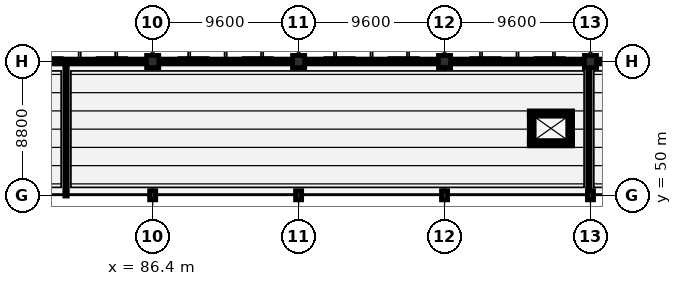
"""IFC4 building model, lengths in metres.
Left out: names, types, materials, properties, quantities, classifications, styles, units other than length and angle.
Written with IfcOpenShell. Run it as: python <this file> out.ifc"""

import sys

from ifc_helpers import new_model, si_unit, direction, frame, frame_2d, origin, origin_2d, place, context, subcontext, project, spatial, polyline, rectangle, outline, extrude, element, fill, save


model = new_model("IFC4")
c1 = context("Model", 3, precision=1e-05, world=origin(), true_north=direction((0.0, 1.0)))
c2 = subcontext(c1, "Body", "Model", "MODEL_VIEW")
j1 = project(units=[si_unit("LENGTHUNIT", "METRE"), si_unit("PLANEANGLEUNIT", "RADIAN")], contexts=[c1])
p1 = place(None, origin())
s1 = spatial("IfcSite", under=j1, at=p1, CompositionType="ELEMENT")
p2 = place(p1, origin())
s2 = spatial("IfcBuilding", under=s1, at=p2, CompositionType="ELEMENT")
p3 = place(p2, frame((0.0, 0.0, 9.6)))
s3 = spatial("IfcBuildingStorey", under=s2, at=p3, CompositionType="ELEMENT", Elevation=9.6)
p4 = place(p3, frame((86.4, 50.0, 0.0), z_axis=(0.0, 0.0, 1.0), x_axis=(1.0, 0.0, 0.0)))
e1 = element("IfcColumn", 1, at=p4, inside=s3, PredefinedType="COLUMN", context=c2, shape_type="SweptSolid", body=[
    extrude(rectangle(XDim=0.4, YDim=0.6, at=origin_2d()), origin(), (0.0, 0.0, 1.0), 4.5),
])
p5 = place(p3, frame((86.4, 58.8, 0.0), z_axis=(0.0, 0.0, 1.0), x_axis=(1.0, 0.0, 0.0)))
e2 = element("IfcColumn", 2, at=p5, inside=s3, PredefinedType="COLUMN", context=c2, shape_type="SweptSolid", body=[
    extrude(rectangle(XDim=0.8, YDim=0.8, at=origin_2d()), origin(), (0.0, 0.0, 1.0), 4.5),
])
p6 = place(p3, frame((96.0, 50.0, 0.0), z_axis=(0.0, 0.0, 1.0), x_axis=(1.0, 0.0, 0.0)))
e3 = element("IfcColumn", 3, at=p6, inside=s3, PredefinedType="COLUMN", context=c2, shape_type="SweptSolid", body=[
    extrude(rectangle(XDim=0.4, YDim=0.6, at=origin_2d()), origin(), (0.0, 0.0, 1.0), 4.5),
])
p7 = place(p3, frame((96.0, 58.8, 0.0), z_axis=(0.0, 0.0, 1.0), x_axis=(1.0, 0.0, 0.0)))
e4 = element("IfcColumn", 4, at=p7, inside=s3, PredefinedType="COLUMN", context=c2, shape_type="SweptSolid", body=[
    extrude(rectangle(XDim=0.8, YDim=0.8, at=origin_2d()), origin(), (0.0, 0.0, 1.0), 4.5),
])
p8 = place(p3, frame((105.6, 50.0, 0.0), z_axis=(0.0, 0.0, 1.0), x_axis=(1.0, 0.0, 0.0)))
e5 = element("IfcColumn", 5, at=p8, inside=s3, PredefinedType="COLUMN", context=c2, shape_type="SweptSolid", body=[
    extrude(rectangle(XDim=0.4, YDim=0.6, at=origin_2d()), origin(), (0.0, 0.0, 1.0), 4.5),
])
p9 = place(p3, frame((105.6, 58.8, 0.0), z_axis=(0.0, 0.0, 1.0), x_axis=(1.0, 0.0, 0.0)))
e6 = element("IfcColumn", 6, at=p9, inside=s3, PredefinedType="COLUMN", context=c2, shape_type="SweptSolid", body=[
    extrude(rectangle(XDim=0.8, YDim=0.8, at=origin_2d()), origin(), (0.0, 0.0, 1.0), 4.5),
])
p10 = place(p3, frame((115.2, 50.0, 0.0), z_axis=(0.0, 0.0, 1.0), x_axis=(1.0, 0.0, 0.0)))
e7 = element("IfcColumn", 7, at=p10, inside=s3, PredefinedType="COLUMN", context=c2, shape_type="SweptSolid", body=[
    extrude(rectangle(XDim=0.4, YDim=0.6, at=origin_2d()), origin(), (0.0, 0.0, 1.0), 4.5),
])
p11 = place(p3, frame((115.2, 58.8, 0.0), z_axis=(0.0, 0.0, 1.0), x_axis=(1.0, 0.0, 0.0)))
e8 = element("IfcColumn", 8, at=p11, inside=s3, PredefinedType="COLUMN", context=c2, shape_type="SweptSolid", body=[
    extrude(rectangle(XDim=0.8, YDim=0.8, at=origin_2d()), origin(), (0.0, 0.0, 1.0), 4.5),
])
p12 = place(p3, frame((77.2, 58.8, 0.0), z_axis=(0.0, 0.0, 1.0), x_axis=(1.0, 0.0, 0.0)))
e9 = element("IfcWall", 9, at=p12, inside=s3, PredefinedType="STANDARD", context=c2, shape_type="SweptSolid", body=[
    extrude(rectangle(XDim=8.8, YDim=0.3, at=frame_2d((4.4, 0.0))), origin(), (0.0, 0.0, 1.0), 1.85),
])
p13 = place(p3, frame((77.2, 58.8, 2.38), z_axis=(0.0, 0.0, 1.0), x_axis=(1.0, 0.0, 0.0)))
e10 = element("IfcWall", 10, at=p13, inside=s3, PredefinedType="STANDARD", context=c2, shape_type="SweptSolid", body=[
    extrude(outline(polyline([(0.0, 0.0), (8.8, 0.0), (8.8, 4.1), (0.0, 3.997), (0.0, 0.0)])), frame((0.0, 0.15, 0.0), z_axis=(0.0, -1.0, 0.0), x_axis=(1.0, 0.0, 0.0)), (0.0, 0.0, 1.0), 0.3),
])
p14 = place(p13, frame((0.85, 0.0, 0.25)))
e11 = element("IfcOpeningElement", 11, at=p14, cuts=e10, PredefinedType="OPENING", context=c2, shape_type="SweptSolid", body=[
    extrude(rectangle(XDim=0.67, YDim=2.29, at=frame_2d((0.335, 1.145))), frame((0.0, 0.16, 0.0), z_axis=(0.0, -1.0, 0.0), x_axis=(1.0, 0.0, 0.0)), (0.0, 0.0, 1.0), 0.32),
])
p15 = place(p13, frame((2.9, 0.0, 0.25)))
e12 = element("IfcOpeningElement", 12, at=p15, cuts=e10, PredefinedType="OPENING", context=c2, shape_type="SweptSolid", body=[
    extrude(rectangle(XDim=0.63, YDim=2.26, at=frame_2d((0.315, 1.13))), frame((0.0, 0.16, 0.0), z_axis=(0.0, -1.0, 0.0), x_axis=(1.0, 0.0, 0.0)), (0.0, 0.0, 1.0), 0.32),
])
p16 = place(p13, frame((4.95, 0.0, 0.25)))
e13 = element("IfcOpeningElement", 13, at=p16, cuts=e10, PredefinedType="OPENING", context=c2, shape_type="SweptSolid", body=[
    extrude(rectangle(XDim=0.75, YDim=2.35, at=frame_2d((0.375, 1.175))), frame((0.0, 0.16, 0.0), z_axis=(0.0, -1.0, 0.0), x_axis=(1.0, 0.0, 0.0)), (0.0, 0.0, 1.0), 0.32),
])
p17 = place(p13, frame((7.0, 0.0, 0.25)))
e14 = element("IfcOpeningElement", 14, at=p17, cuts=e10, PredefinedType="OPENING", context=c2, shape_type="SweptSolid", body=[
    extrude(rectangle(XDim=0.71, YDim=2.32, at=frame_2d((0.355, 1.16))), frame((0.0, 0.16, 0.0), z_axis=(0.0, -1.0, 0.0), x_axis=(1.0, 0.0, 0.0)), (0.0, 0.0, 1.0), 0.32),
])
p18 = place(p3, frame((86.8, 58.8, 0.0), z_axis=(0.0, 0.0, 1.0), x_axis=(1.0, 0.0, 0.0)))
e15 = element("IfcWall", 15, at=p18, inside=s3, PredefinedType="STANDARD", context=c2, shape_type="SweptSolid", body=[
    extrude(rectangle(XDim=8.8, YDim=0.3, at=frame_2d((4.4, 0.0))), origin(), (0.0, 0.0, 1.0), 1.85),
])
p19 = place(p3, frame((86.8, 58.8, 2.38), z_axis=(0.0, 0.0, 1.0), x_axis=(1.0, 0.0, 0.0)))
e16 = element("IfcWall", 16, at=p19, inside=s3, PredefinedType="STANDARD", context=c2, shape_type="SweptSolid", body=[
    extrude(outline(polyline([(0.0, 0.0), (8.8, 0.0), (8.8, 3.997), (0.0, 4.1), (0.0, 0.0)])), frame((0.0, 0.15, 0.0), z_axis=(0.0, -1.0, 0.0), x_axis=(1.0, 0.0, 0.0)), (0.0, 0.0, 1.0), 0.3),
])
p20 = place(p19, frame((0.85, 0.0, 0.25)))
e17 = element("IfcOpeningElement", 17, at=p20, cuts=e16, PredefinedType="OPENING", context=c2, shape_type="SweptSolid", body=[
    extrude(rectangle(XDim=0.67, YDim=2.29, at=frame_2d((0.335, 1.145))), frame((0.0, 0.16, 0.0), z_axis=(0.0, -1.0, 0.0), x_axis=(1.0, 0.0, 0.0)), (0.0, 0.0, 1.0), 0.32),
])
p21 = place(p19, frame((2.9, 0.0, 0.25)))
e18 = element("IfcOpeningElement", 18, at=p21, cuts=e16, PredefinedType="OPENING", context=c2, shape_type="SweptSolid", body=[
    extrude(rectangle(XDim=0.63, YDim=2.26, at=frame_2d((0.315, 1.13))), frame((0.0, 0.16, 0.0), z_axis=(0.0, -1.0, 0.0), x_axis=(1.0, 0.0, 0.0)), (0.0, 0.0, 1.0), 0.32),
])
p22 = place(p19, frame((4.95, 0.0, 0.25)))
e19 = element("IfcOpeningElement", 19, at=p22, cuts=e16, PredefinedType="OPENING", context=c2, shape_type="SweptSolid", body=[
    extrude(rectangle(XDim=0.75, YDim=2.35, at=frame_2d((0.375, 1.175))), frame((0.0, 0.16, 0.0), z_axis=(0.0, -1.0, 0.0), x_axis=(1.0, 0.0, 0.0)), (0.0, 0.0, 1.0), 0.32),
])
p23 = place(p19, frame((7.0, 0.0, 0.25)))
e20 = element("IfcOpeningElement", 20, at=p23, cuts=e16, PredefinedType="OPENING", context=c2, shape_type="SweptSolid", body=[
    extrude(rectangle(XDim=0.71, YDim=2.32, at=frame_2d((0.355, 1.16))), frame((0.0, 0.16, 0.0), z_axis=(0.0, -1.0, 0.0), x_axis=(1.0, 0.0, 0.0)), (0.0, 0.0, 1.0), 0.32),
])
p24 = place(p3, frame((96.4, 58.8, 0.0), z_axis=(0.0, 0.0, 1.0), x_axis=(1.0, 0.0, 0.0)))
e21 = element("IfcWall", 21, at=p24, inside=s3, PredefinedType="STANDARD", context=c2, shape_type="SweptSolid", body=[
    extrude(rectangle(XDim=8.8, YDim=0.3, at=frame_2d((4.4, 0.0))), origin(), (0.0, 0.0, 1.0), 1.85),
])
p25 = place(p3, frame((96.4, 58.8, 2.38), z_axis=(0.0, 0.0, 1.0), x_axis=(1.0, 0.0, 0.0)))
e22 = element("IfcWall", 22, at=p25, inside=s3, PredefinedType="STANDARD", context=c2, shape_type="SweptSolid", body=[
    extrude(outline(polyline([(0.0, 0.0), (8.8, 0.0), (8.8, 3.705), (0.0, 3.997), (0.0, 0.0)])), frame((0.0, 0.15, 0.0), z_axis=(0.0, -1.0, 0.0), x_axis=(1.0, 0.0, 0.0)), (0.0, 0.0, 1.0), 0.3),
])
p26 = place(p25, frame((0.85, 0.0, 0.25)))
e23 = element("IfcOpeningElement", 23, at=p26, cuts=e22, PredefinedType="OPENING", context=c2, shape_type="SweptSolid", body=[
    extrude(rectangle(XDim=0.67, YDim=2.29, at=frame_2d((0.335, 1.145))), frame((0.0, 0.16, 0.0), z_axis=(0.0, -1.0, 0.0), x_axis=(1.0, 0.0, 0.0)), (0.0, 0.0, 1.0), 0.32),
])
p27 = place(p25, frame((2.9, 0.0, 0.25)))
e24 = element("IfcOpeningElement", 24, at=p27, cuts=e22, PredefinedType="OPENING", context=c2, shape_type="SweptSolid", body=[
    extrude(rectangle(XDim=0.63, YDim=2.26, at=frame_2d((0.315, 1.13))), frame((0.0, 0.16, 0.0), z_axis=(0.0, -1.0, 0.0), x_axis=(1.0, 0.0, 0.0)), (0.0, 0.0, 1.0), 0.32),
])
p28 = place(p25, frame((4.95, 0.0, 0.25)))
e25 = element("IfcOpeningElement", 25, at=p28, cuts=e22, PredefinedType="OPENING", context=c2, shape_type="SweptSolid", body=[
    extrude(rectangle(XDim=0.75, YDim=2.35, at=frame_2d((0.375, 1.175))), frame((0.0, 0.16, 0.0), z_axis=(0.0, -1.0, 0.0), x_axis=(1.0, 0.0, 0.0)), (0.0, 0.0, 1.0), 0.32),
])
p29 = place(p25, frame((7.0, 0.0, 0.25)))
e26 = element("IfcOpeningElement", 26, at=p29, cuts=e22, PredefinedType="OPENING", context=c2, shape_type="SweptSolid", body=[
    extrude(rectangle(XDim=0.71, YDim=2.32, at=frame_2d((0.355, 1.16))), frame((0.0, 0.16, 0.0), z_axis=(0.0, -1.0, 0.0), x_axis=(1.0, 0.0, 0.0)), (0.0, 0.0, 1.0), 0.32),
])
p30 = place(p3, frame((106.0, 58.8, 0.0), z_axis=(0.0, 0.0, 1.0), x_axis=(1.0, 0.0, 0.0)))
e27 = element("IfcWall", 27, at=p30, inside=s3, PredefinedType="STANDARD", context=c2, shape_type="SweptSolid", body=[
    extrude(rectangle(XDim=8.8, YDim=0.3, at=frame_2d((4.4, 0.0))), origin(), (0.0, 0.0, 1.0), 1.85),
])
p31 = place(p3, frame((106.0, 58.8, 2.38), z_axis=(0.0, 0.0, 1.0), x_axis=(1.0, 0.0, 0.0)))
e28 = element("IfcWall", 28, at=p31, inside=s3, PredefinedType="STANDARD", context=c2, shape_type="SweptSolid", body=[
    extrude(outline(polyline([(0.0, 0.0), (8.8, 0.0), (8.8, 3.267), (0.0, 3.705), (0.0, 0.0)])), frame((0.0, 0.15, 0.0), z_axis=(0.0, -1.0, 0.0), x_axis=(1.0, 0.0, 0.0)), (0.0, 0.0, 1.0), 0.3),
])
p32 = place(p31, frame((0.85, 0.0, 0.25)))
e29 = element("IfcOpeningElement", 29, at=p32, cuts=e28, PredefinedType="OPENING", context=c2, shape_type="SweptSolid", body=[
    extrude(rectangle(XDim=0.67, YDim=2.29, at=frame_2d((0.335, 1.145))), frame((0.0, 0.16, 0.0), z_axis=(0.0, -1.0, 0.0), x_axis=(1.0, 0.0, 0.0)), (0.0, 0.0, 1.0), 0.32),
])
p33 = place(p31, frame((2.9, 0.0, 0.25)))
e30 = element("IfcOpeningElement", 30, at=p33, cuts=e28, PredefinedType="OPENING", context=c2, shape_type="SweptSolid", body=[
    extrude(rectangle(XDim=0.63, YDim=2.26, at=frame_2d((0.315, 1.13))), frame((0.0, 0.16, 0.0), z_axis=(0.0, -1.0, 0.0), x_axis=(1.0, 0.0, 0.0)), (0.0, 0.0, 1.0), 0.32),
])
p34 = place(p31, frame((4.95, 0.0, 0.25)))
e31 = element("IfcOpeningElement", 31, at=p34, cuts=e28, PredefinedType="OPENING", context=c2, shape_type="SweptSolid", body=[
    extrude(rectangle(XDim=0.75, YDim=2.35, at=frame_2d((0.375, 1.175))), frame((0.0, 0.16, 0.0), z_axis=(0.0, -1.0, 0.0), x_axis=(1.0, 0.0, 0.0)), (0.0, 0.0, 1.0), 0.32),
])
p35 = place(p31, frame((7.0, 0.0, 0.25)))
e32 = element("IfcOpeningElement", 32, at=p35, cuts=e28, PredefinedType="OPENING", context=c2, shape_type="SweptSolid", body=[
    extrude(rectangle(XDim=0.71, YDim=2.32, at=frame_2d((0.355, 1.16))), frame((0.0, 0.16, 0.0), z_axis=(0.0, -1.0, 0.0), x_axis=(1.0, 0.0, 0.0)), (0.0, 0.0, 1.0), 0.32),
])
p36 = place(p3, frame((115.6, 58.8, 0.0), z_axis=(0.0, 0.0, 1.0), x_axis=(1.0, 0.0, 0.0)))
e33 = element("IfcWall", 33, at=p36, inside=s3, PredefinedType="STANDARD", context=c2, shape_type="SweptSolid", body=[
    extrude(rectangle(XDim=8.8, YDim=0.3, at=frame_2d((4.4, 0.0))), origin(), (0.0, 0.0, 1.0), 1.85),
])
p37 = place(p3, frame((115.6, 58.8, 2.38), z_axis=(0.0, 0.0, 1.0), x_axis=(1.0, 0.0, 0.0)))
e34 = element("IfcWall", 34, at=p37, inside=s3, PredefinedType="STANDARD", context=c2, shape_type="SweptSolid", body=[
    extrude(outline(polyline([(0.0, 0.0), (8.8, 0.0), (8.8, 2.75), (0.0, 3.267), (0.0, 0.0)])), frame((0.0, 0.15, 0.0), z_axis=(0.0, -1.0, 0.0), x_axis=(1.0, 0.0, 0.0)), (0.0, 0.0, 1.0), 0.3),
])
p38 = place(p37, frame((0.85, 0.0, 0.25)))
e35 = element("IfcOpeningElement", 35, at=p38, cuts=e34, PredefinedType="OPENING", context=c2, shape_type="SweptSolid", body=[
    extrude(rectangle(XDim=0.67, YDim=2.29, at=frame_2d((0.335, 1.145))), frame((0.0, 0.16, 0.0), z_axis=(0.0, -1.0, 0.0), x_axis=(1.0, 0.0, 0.0)), (0.0, 0.0, 1.0), 0.32),
])
p39 = place(p37, frame((2.9, 0.0, 0.25)))
e36 = element("IfcOpeningElement", 36, at=p39, cuts=e34, PredefinedType="OPENING", context=c2, shape_type="SweptSolid", body=[
    extrude(rectangle(XDim=0.63, YDim=2.26, at=frame_2d((0.315, 1.13))), frame((0.0, 0.16, 0.0), z_axis=(0.0, -1.0, 0.0), x_axis=(1.0, 0.0, 0.0)), (0.0, 0.0, 1.0), 0.32),
])
p40 = place(p37, frame((4.95, 0.0, 0.25)))
e37 = element("IfcOpeningElement", 37, at=p40, cuts=e34, PredefinedType="OPENING", context=c2, shape_type="SweptSolid", body=[
    extrude(rectangle(XDim=0.75, YDim=2.35, at=frame_2d((0.375, 1.175))), frame((0.0, 0.16, 0.0), z_axis=(0.0, -1.0, 0.0), x_axis=(1.0, 0.0, 0.0)), (0.0, 0.0, 1.0), 0.32),
])
p41 = place(p37, frame((7.0, 0.0, 0.25)))
e38 = element("IfcOpeningElement", 38, at=p41, cuts=e34, PredefinedType="OPENING", context=c2, shape_type="SweptSolid", body=[
    extrude(rectangle(XDim=0.71, YDim=2.32, at=frame_2d((0.355, 1.16))), frame((0.0, 0.16, 0.0), z_axis=(0.0, -1.0, 0.0), x_axis=(1.0, 0.0, 0.0)), (0.0, 0.0, 1.0), 0.32),
])
p42 = place(p3, frame((114.025, 53.375, 0.0), z_axis=(0.0, 0.0, 1.0), x_axis=(-1.0, 0.0, 0.0)))
e39 = element("IfcWall", 39, at=p42, inside=s3, PredefinedType="SOLIDWALL", context=c2, shape_type="SweptSolid", body=[
    extrude(rectangle(XDim=2.85, YDim=0.25, at=frame_2d((1.425, 0.0))), origin(), (0.0, 0.0, 1.0), 3.55),
])
p43 = place(p42, frame((0.875, 0.0, 0.0)))
e40 = element("IfcOpeningElement", 40, at=p43, cuts=e39, PredefinedType="OPENING", context=c2, shape_type="SweptSolid", body=[
    extrude(rectangle(XDim=1.1, YDim=2.15, at=frame_2d((0.55, 1.075))), frame((0.0, 0.135, 0.0), z_axis=(0.0, -1.0, 0.0), x_axis=(1.0, 0.0, 0.0)), (0.0, 0.0, 1.0), 0.27),
])
p44 = place(p3, frame((111.175, 55.425, 0.0), z_axis=(0.0, 0.0, 1.0), x_axis=(1.0, 0.0, 0.0)))
e41 = element("IfcWall", 41, at=p44, inside=s3, PredefinedType="SOLIDWALL", context=c2, shape_type="SweptSolid", body=[
    extrude(rectangle(XDim=2.85, YDim=0.25, at=frame_2d((1.425, 0.0))), origin(), (0.0, 0.0, 1.0), 3.55),
])
for number, where, z_axis, x_axis in (
    (42, (111.3, 53.5, 0.0), (0.0, 0.0, 1.0), (0.0, 1.0, 0.0)),
    (43, (113.9, 55.3, 0.0), (0.0, 0.0, 1.0), (0.0, -1.0, 0.0)),
):
    element("IfcWall", number, at=place(p3, frame(where, z_axis=z_axis, x_axis=x_axis)), inside=s3, PredefinedType="SOLIDWALL", context=c2, shape_type="SweptSolid", body=[
        extrude(rectangle(XDim=1.8, YDim=0.25, at=frame_2d((0.9, 0.0))), origin(), (0.0, 0.0, 1.0), 3.55),
    ])
p45 = place(p3, frame((80.7, 49.95, 0.0), z_axis=(0.0, 0.0, 1.0), x_axis=(0.0, 1.0, 0.0)))
e44 = element("IfcWall", 44, at=p45, inside=s3, PredefinedType="PARTITIONING", context=c2, shape_type="SweptSolid", body=[
    extrude(rectangle(XDim=8.8, YDim=0.16, at=frame_2d((4.4, 0.0))), origin(), (0.0, 0.0, 1.0), 2.4),
])
p46 = place(p45, frame((3.5, 0.0, 0.0)))
e45 = element("IfcOpeningElement", 45, at=p46, cuts=e44, PredefinedType="OPENING", context=c2, shape_type="SweptSolid", body=[
    extrude(rectangle(XDim=1.8, YDim=2.15, at=frame_2d((0.9, 1.075))), frame((0.0, 0.09, 0.0), z_axis=(0.0, -1.0, 0.0), x_axis=(1.0, 0.0, 0.0)), (0.0, 0.0, 1.0), 0.18),
])
p47 = place(p3, frame((115.1, 49.95, 0.0), z_axis=(0.0, 0.0, 1.0), x_axis=(0.0, 1.0, 0.0)))
e46 = element("IfcWall", 46, at=p47, inside=s3, PredefinedType="PARTITIONING", context=c2, shape_type="SweptSolid", body=[
    extrude(rectangle(XDim=8.8, YDim=0.16, at=frame_2d((4.4, 0.0))), origin(), (0.0, 0.0, 1.0), 2.4),
])
p48 = place(p47, frame((3.5, 0.0, 0.0)))
e47 = element("IfcOpeningElement", 47, at=p48, cuts=e46, PredefinedType="OPENING", context=c2, shape_type="SweptSolid", body=[
    extrude(rectangle(XDim=1.8, YDim=2.15, at=frame_2d((0.9, 1.075))), frame((0.0, 0.09, 0.0), z_axis=(0.0, -1.0, 0.0), x_axis=(1.0, 0.0, 0.0)), (0.0, 0.0, 1.0), 0.18),
])
p49 = place(p15, origin())
e48 = element("IfcWindow", 48, at=p49, inside=s3, PartitioningType="SINGLE_PANEL", PredefinedType="WINDOW", context=c2, shape_type="SweptSolid", body=[
    extrude(rectangle(XDim=0.63, YDim=2.26, at=frame_2d((0.315, 1.13))), frame((0.0, 0.03, 0.0), z_axis=(0.0, -1.0, 0.0), x_axis=(1.0, 0.0, 0.0)), (0.0, 0.0, 1.0), 0.06),
])
fill(e12, e48)
p50 = place(p16, origin())
e49 = element("IfcWindow", 49, at=p50, inside=s3, PartitioningType="SINGLE_PANEL", PredefinedType="WINDOW", context=c2, shape_type="SweptSolid", body=[
    extrude(rectangle(XDim=0.75, YDim=2.35, at=frame_2d((0.375, 1.175))), frame((0.0, 0.03, 0.0), z_axis=(0.0, -1.0, 0.0), x_axis=(1.0, 0.0, 0.0)), (0.0, 0.0, 1.0), 0.06),
])
fill(e13, e49)
p51 = place(p17, origin())
e50 = element("IfcWindow", 50, at=p51, inside=s3, PartitioningType="SINGLE_PANEL", PredefinedType="WINDOW", context=c2, shape_type="SweptSolid", body=[
    extrude(rectangle(XDim=0.71, YDim=2.32, at=frame_2d((0.355, 1.16))), frame((0.0, 0.03, 0.0), z_axis=(0.0, -1.0, 0.0), x_axis=(1.0, 0.0, 0.0)), (0.0, 0.0, 1.0), 0.06),
])
fill(e14, e50)
p52 = place(p20, origin())
e51 = element("IfcWindow", 51, at=p52, inside=s3, PartitioningType="SINGLE_PANEL", PredefinedType="WINDOW", context=c2, shape_type="SweptSolid", body=[
    extrude(rectangle(XDim=0.67, YDim=2.29, at=frame_2d((0.335, 1.145))), frame((0.0, 0.03, 0.0), z_axis=(0.0, -1.0, 0.0), x_axis=(1.0, 0.0, 0.0)), (0.0, 0.0, 1.0), 0.06),
])
fill(e17, e51)
p53 = place(p21, origin())
e52 = element("IfcWindow", 52, at=p53, inside=s3, PartitioningType="SINGLE_PANEL", PredefinedType="WINDOW", context=c2, shape_type="SweptSolid", body=[
    extrude(rectangle(XDim=0.63, YDim=2.26, at=frame_2d((0.315, 1.13))), frame((0.0, 0.03, 0.0), z_axis=(0.0, -1.0, 0.0), x_axis=(1.0, 0.0, 0.0)), (0.0, 0.0, 1.0), 0.06),
])
fill(e18, e52)
p54 = place(p22, origin())
e53 = element("IfcWindow", 53, at=p54, inside=s3, PartitioningType="SINGLE_PANEL", PredefinedType="WINDOW", context=c2, shape_type="SweptSolid", body=[
    extrude(rectangle(XDim=0.75, YDim=2.35, at=frame_2d((0.375, 1.175))), frame((0.0, 0.03, 0.0), z_axis=(0.0, -1.0, 0.0), x_axis=(1.0, 0.0, 0.0)), (0.0, 0.0, 1.0), 0.06),
])
fill(e19, e53)
p55 = place(p23, origin())
e54 = element("IfcWindow", 54, at=p55, inside=s3, PartitioningType="SINGLE_PANEL", PredefinedType="WINDOW", context=c2, shape_type="SweptSolid", body=[
    extrude(rectangle(XDim=0.71, YDim=2.32, at=frame_2d((0.355, 1.16))), frame((0.0, 0.03, 0.0), z_axis=(0.0, -1.0, 0.0), x_axis=(1.0, 0.0, 0.0)), (0.0, 0.0, 1.0), 0.06),
])
fill(e20, e54)
p56 = place(p26, origin())
e55 = element("IfcWindow", 55, at=p56, inside=s3, PartitioningType="SINGLE_PANEL", PredefinedType="WINDOW", context=c2, shape_type="SweptSolid", body=[
    extrude(rectangle(XDim=0.67, YDim=2.29, at=frame_2d((0.335, 1.145))), frame((0.0, 0.03, 0.0), z_axis=(0.0, -1.0, 0.0), x_axis=(1.0, 0.0, 0.0)), (0.0, 0.0, 1.0), 0.06),
])
fill(e23, e55)
p57 = place(p27, origin())
e56 = element("IfcWindow", 56, at=p57, inside=s3, PartitioningType="SINGLE_PANEL", PredefinedType="WINDOW", context=c2, shape_type="SweptSolid", body=[
    extrude(rectangle(XDim=0.63, YDim=2.26, at=frame_2d((0.315, 1.13))), frame((0.0, 0.03, 0.0), z_axis=(0.0, -1.0, 0.0), x_axis=(1.0, 0.0, 0.0)), (0.0, 0.0, 1.0), 0.06),
])
fill(e24, e56)
p58 = place(p28, origin())
e57 = element("IfcWindow", 57, at=p58, inside=s3, PartitioningType="SINGLE_PANEL", PredefinedType="WINDOW", context=c2, shape_type="SweptSolid", body=[
    extrude(rectangle(XDim=0.75, YDim=2.35, at=frame_2d((0.375, 1.175))), frame((0.0, 0.03, 0.0), z_axis=(0.0, -1.0, 0.0), x_axis=(1.0, 0.0, 0.0)), (0.0, 0.0, 1.0), 0.06),
])
fill(e25, e57)
p59 = place(p29, origin())
e58 = element("IfcWindow", 58, at=p59, inside=s3, PartitioningType="SINGLE_PANEL", PredefinedType="WINDOW", context=c2, shape_type="SweptSolid", body=[
    extrude(rectangle(XDim=0.71, YDim=2.32, at=frame_2d((0.355, 1.16))), frame((0.0, 0.03, 0.0), z_axis=(0.0, -1.0, 0.0), x_axis=(1.0, 0.0, 0.0)), (0.0, 0.0, 1.0), 0.06),
])
fill(e26, e58)
p60 = place(p32, origin())
e59 = element("IfcWindow", 59, at=p60, inside=s3, PartitioningType="SINGLE_PANEL", PredefinedType="WINDOW", context=c2, shape_type="SweptSolid", body=[
    extrude(rectangle(XDim=0.67, YDim=2.29, at=frame_2d((0.335, 1.145))), frame((0.0, 0.03, 0.0), z_axis=(0.0, -1.0, 0.0), x_axis=(1.0, 0.0, 0.0)), (0.0, 0.0, 1.0), 0.06),
])
fill(e29, e59)
p61 = place(p33, origin())
e60 = element("IfcWindow", 60, at=p61, inside=s3, PartitioningType="SINGLE_PANEL", PredefinedType="WINDOW", context=c2, shape_type="SweptSolid", body=[
    extrude(rectangle(XDim=0.63, YDim=2.26, at=frame_2d((0.315, 1.13))), frame((0.0, 0.03, 0.0), z_axis=(0.0, -1.0, 0.0), x_axis=(1.0, 0.0, 0.0)), (0.0, 0.0, 1.0), 0.06),
])
fill(e30, e60)
p62 = place(p34, origin())
e61 = element("IfcWindow", 61, at=p62, inside=s3, PartitioningType="SINGLE_PANEL", PredefinedType="WINDOW", context=c2, shape_type="SweptSolid", body=[
    extrude(rectangle(XDim=0.75, YDim=2.35, at=frame_2d((0.375, 1.175))), frame((0.0, 0.03, 0.0), z_axis=(0.0, -1.0, 0.0), x_axis=(1.0, 0.0, 0.0)), (0.0, 0.0, 1.0), 0.06),
])
fill(e31, e61)
p63 = place(p35, origin())
e62 = element("IfcWindow", 62, at=p63, inside=s3, PartitioningType="SINGLE_PANEL", PredefinedType="WINDOW", context=c2, shape_type="SweptSolid", body=[
    extrude(rectangle(XDim=0.71, YDim=2.32, at=frame_2d((0.355, 1.16))), frame((0.0, 0.03, 0.0), z_axis=(0.0, -1.0, 0.0), x_axis=(1.0, 0.0, 0.0)), (0.0, 0.0, 1.0), 0.06),
])
fill(e32, e62)
p64 = place(p43, origin())
e63 = element("IfcDoor", 63, at=p64, inside=s3, OperationType="DOUBLE_DOOR_SLIDING", PredefinedType="DOOR", context=c2, shape_type="SweptSolid", body=[
    extrude(rectangle(XDim=1.1, YDim=2.15, at=frame_2d((0.55, 1.075))), frame((0.0, 0.025, 0.0), z_axis=(0.0, -1.0, 0.0), x_axis=(1.0, 0.0, 0.0)), (0.0, 0.0, 1.0), 0.05),
])
fill(e40, e63)
p65 = place(p46, origin())
e64 = element("IfcDoor", 64, at=p65, inside=s3, OperationType="DOUBLE_DOOR_SINGLE_SWING", PredefinedType="DOOR", context=c2, shape_type="SweptSolid", body=[
    extrude(rectangle(XDim=1.8, YDim=2.15, at=frame_2d((0.9, 1.075))), frame((0.0, 0.025, 0.0), z_axis=(0.0, -1.0, 0.0), x_axis=(1.0, 0.0, 0.0)), (0.0, 0.0, 1.0), 0.05),
])
fill(e45, e64)
p66 = place(p48, origin())
e65 = element("IfcDoor", 65, at=p66, inside=s3, OperationType="DOUBLE_DOOR_SINGLE_SWING", PredefinedType="DOOR", context=c2, shape_type="SweptSolid", body=[
    extrude(rectangle(XDim=1.8, YDim=2.15, at=frame_2d((0.9, 1.075))), frame((0.0, 0.025, 0.0), z_axis=(0.0, -1.0, 0.0), x_axis=(1.0, 0.0, 0.0)), (0.0, 0.0, 1.0), 0.05),
])
fill(e47, e65)
save(model, sys.argv[1])
